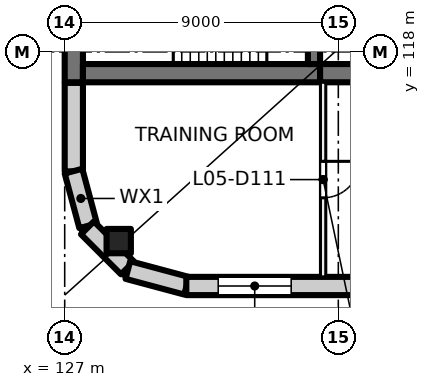
"""IFC4 building model, lengths in metres.
Left out: names, types, materials, properties, quantities, classifications, styles, units other than length and angle.
Written with IfcOpenShell. Run it as: python <this file> out.ifc"""

import sys

from ifc_helpers import new_model, si_unit, direction, frame, frame_2d, origin, origin_2d, place, context, subcontext, project, spatial, rectangle, extrude, element, fill, save


model = new_model("IFC4")
c1 = context("Model", 3, precision=1e-05, world=origin(), true_north=direction((0.0, 1.0)))
c2 = subcontext(c1, "Body", "Model", "MODEL_VIEW")
j1 = project(units=[si_unit("LENGTHUNIT", "METRE"), si_unit("PLANEANGLEUNIT", "RADIAN")], contexts=[c1])
p1 = place(None, origin())
s1 = spatial("IfcSite", under=j1, at=p1, CompositionType="ELEMENT")
p2 = place(p1, origin())
s2 = spatial("IfcBuilding", under=s1, at=p2, CompositionType="ELEMENT")
p3 = place(p2, frame((0.0, 0.0, 27.5)))
s3 = spatial("IfcBuildingStorey", under=s2, at=p3, CompositionType="ELEMENT", Elevation=27.5)
p4 = place(p3, frame((128.777, 111.777, 0.0), z_axis=(0.0, 0.0, 1.0), x_axis=(1.0, 0.0, 0.0)))
e1 = element("IfcColumn", 1, at=p4, inside=s3, PredefinedType="COLUMN", context=c2, shape_type="SweptSolid", body=[
    extrude(rectangle(XDim=0.8, YDim=0.8, at=origin_2d()), origin(), (0.0, 0.0, 1.0), 4.0),
])
p5 = place(p3, frame((127.3, 117.0, 0.0), z_axis=(0.0, 0.0, 1.0), x_axis=(0.0, 1.0, 0.0)))
e2 = element("IfcWall", 2, at=p5, inside=s3, PredefinedType="SHEAR", context=c2, shape_type="SweptSolid", body=[
    extrude(rectangle(XDim=3.8, YDim=0.6, at=frame_2d((1.9, 0.0))), origin(), (0.0, 0.0, 1.0), 4.0),
])
p6 = place(p3, frame((127.6, 117.3, 0.0), z_axis=(0.0, 0.0, 1.0), x_axis=(1.0, 0.0, 0.0)))
e3 = element("IfcWall", 3, at=p6, inside=s3, PredefinedType="SHEAR", context=c2, shape_type="SweptSolid", body=[
    extrude(rectangle(XDim=7.8, YDim=0.6, at=frame_2d((3.9, 0.0))), origin(), (0.0, 0.0, 1.0), 4.0),
])
p7 = place(p3, frame((135.4, 117.3, 0.0), z_axis=(0.0, 0.0, 1.0), x_axis=(1.0, 0.0, 0.0)))
e4 = element("IfcWall", 4, at=p7, inside=s3, PredefinedType="SHEAR", context=c2, shape_type="SweptSolid", body=[
    extrude(rectangle(XDim=4.6, YDim=0.6, at=frame_2d((2.3, 0.0))), origin(), (0.0, 0.0, 1.0), 4.0),
])
p8 = place(p3, frame((135.2, 117.6, 0.0), z_axis=(0.0, 0.0, 1.0), x_axis=(0.0, 1.0, 0.0)))
e5 = element("IfcWall", 5, at=p8, inside=s3, PredefinedType="SHEAR", context=c2, shape_type="SweptSolid", body=[
    extrude(rectangle(XDim=2.8, YDim=0.4, at=frame_2d((1.4, 0.0))), origin(), (0.0, 0.0, 1.0), 4.0),
])
p9 = place(p8, frame((0.9, 0.0, 0.0)))
e6 = element("IfcOpeningElement", 6, at=p9, cuts=e5, PredefinedType="OPENING", context=c2, shape_type="SweptSolid", body=[
    extrude(rectangle(XDim=1.0, YDim=2.1, at=frame_2d((0.5, 1.05))), frame((0.0, 0.21, 0.0), z_axis=(0.0, -1.0, 0.0), x_axis=(1.0, 0.0, 0.0)), (0.0, 0.0, 1.0), 0.42),
])
p10 = place(p3, frame((127.3, 114.07, 0.0), z_axis=(0.0, 0.0, 1.0), x_axis=(0.0, 1.0, 0.0)))
e7 = element("IfcWall", 7, at=p10, inside=s3, PredefinedType="SOLIDWALL", context=c2, shape_type="SweptSolid", body=[
    extrude(rectangle(XDim=2.91, YDim=0.6, at=frame_2d((1.455, 0.0))), origin(), (0.0, 0.0, 1.0), 3.625),
])
for number, where, z_axis, x_axis in (
    (8, (127.771, 112.281, 0.0), (0.0, 0.0, 1.0), (-0.259, 0.966, 0.0)),
    (9, (129.064, 110.896, 0.0), (0.0, 0.0, 1.0), (-0.707, 0.707, 0.0)),
):
    element("IfcWall", number, at=place(p3, frame(where, z_axis=z_axis, x_axis=x_axis)), inside=s3, PredefinedType="SOLIDWALL", context=c2, shape_type="SweptSolid", body=[
        extrude(rectangle(XDim=1.861, YDim=0.6, at=frame_2d((0.93, 0.0))), origin(), (0.0, 0.0, 1.0), 3.625),
    ])
p11 = place(p3, frame((131.01, 110.308, 0.0), z_axis=(0.0, 0.0, 1.0), x_axis=(-0.965920269068, 0.258839784042, 0.0)))
e10 = element("IfcWall", 10, at=p11, inside=s3, PredefinedType="SOLIDWALL", context=c2, shape_type="SweptSolid", body=[
    extrude(rectangle(XDim=2.0, YDim=0.6, at=frame_2d((1.0, 0.0))), origin(), (0.0, 0.0, 1.0), 3.625),
])
p12 = place(p3, frame((162.93, 110.3, 0.0), z_axis=(0.0, 0.0, 1.0), x_axis=(-1.0, 0.0, 0.0)))
e11 = element("IfcWall", 11, at=p12, inside=s3, PredefinedType="SOLIDWALL", context=c2, shape_type="SweptSolid", body=[
    extrude(rectangle(XDim=31.93, YDim=0.6, at=frame_2d((15.965, 0.0))), origin(), (0.0, 0.0, 1.0), 3.625),
])
p13 = place(p12, frame((1.78, 0.0, 0.0)))
e12 = element("IfcOpeningElement", 12, at=p13, cuts=e11, PredefinedType="OPENING", context=c2, shape_type="SweptSolid", body=[
    extrude(rectangle(XDim=1.8, YDim=2.4, at=frame_2d((0.9, 1.2))), frame((0.0, 0.31, 0.0), z_axis=(0.0, -1.0, 0.0), x_axis=(1.0, 0.0, 0.0)), (0.0, 0.0, 1.0), 0.62),
])
p14 = place(p12, frame((5.98, 0.0, 0.9)))
e13 = element("IfcOpeningElement", 13, at=p14, cuts=e11, PredefinedType="OPENING", context=c2, shape_type="SweptSolid", body=[
    extrude(rectangle(XDim=2.4, YDim=2.4, at=frame_2d((1.2, 1.2))), frame((0.0, 0.31, 0.0), z_axis=(0.0, -1.0, 0.0), x_axis=(1.0, 0.0, 0.0)), (0.0, 0.0, 1.0), 0.62),
])
p15 = place(p12, frame((10.48, 0.0, 0.9)))
e14 = element("IfcOpeningElement", 14, at=p15, cuts=e11, PredefinedType="OPENING", context=c2, shape_type="SweptSolid", body=[
    extrude(rectangle(XDim=2.4, YDim=2.4, at=frame_2d((1.2, 1.2))), frame((0.0, 0.31, 0.0), z_axis=(0.0, -1.0, 0.0), x_axis=(1.0, 0.0, 0.0)), (0.0, 0.0, 1.0), 0.62),
])
p16 = place(p12, frame((14.98, 0.0, 0.9)))
e15 = element("IfcOpeningElement", 15, at=p16, cuts=e11, PredefinedType="OPENING", context=c2, shape_type="SweptSolid", body=[
    extrude(rectangle(XDim=2.4, YDim=2.4, at=frame_2d((1.2, 1.2))), frame((0.0, 0.31, 0.0), z_axis=(0.0, -1.0, 0.0), x_axis=(1.0, 0.0, 0.0)), (0.0, 0.0, 1.0), 0.62),
])
p17 = place(p12, frame((19.78, 0.0, 0.0)))
e16 = element("IfcOpeningElement", 16, at=p17, cuts=e11, PredefinedType="OPENING", context=c2, shape_type="SweptSolid", body=[
    extrude(rectangle(XDim=1.8, YDim=2.4, at=frame_2d((0.9, 1.2))), frame((0.0, 0.31, 0.0), z_axis=(0.0, -1.0, 0.0), x_axis=(1.0, 0.0, 0.0)), (0.0, 0.0, 1.0), 0.62),
])
p18 = place(p12, frame((23.98, 0.0, 0.9)))
e17 = element("IfcOpeningElement", 17, at=p18, cuts=e11, PredefinedType="OPENING", context=c2, shape_type="SweptSolid", body=[
    extrude(rectangle(XDim=2.4, YDim=2.4, at=frame_2d((1.2, 1.2))), frame((0.0, 0.31, 0.0), z_axis=(0.0, -1.0, 0.0), x_axis=(1.0, 0.0, 0.0)), (0.0, 0.0, 1.0), 0.62),
])
p19 = place(p12, frame((28.48, 0.0, 0.9)))
e18 = element("IfcOpeningElement", 18, at=p19, cuts=e11, PredefinedType="OPENING", context=c2, shape_type="SweptSolid", body=[
    extrude(rectangle(XDim=2.4, YDim=2.4, at=frame_2d((1.2, 1.2))), frame((0.0, 0.31, 0.0), z_axis=(0.0, -1.0, 0.0), x_axis=(1.0, 0.0, 0.0)), (0.0, 0.0, 1.0), 0.62),
])
p20 = place(p3, frame((135.5, 117.0, 0.0), z_axis=(0.0, 0.0, 1.0), x_axis=(0.0, -1.0, 0.0)))
e19 = element("IfcWall", 19, at=p20, inside=s3, PredefinedType="PARTITIONING", context=c2, shape_type="SweptSolid", body=[
    extrude(rectangle(XDim=6.4, YDim=0.175, at=frame_2d((3.2, 0.0))), origin(), (0.0, 0.0, 1.0), 3.625),
])
p21 = place(p20, frame((2.6, 0.0, 0.0)))
e20 = element("IfcOpeningElement", 20, at=p21, cuts=e19, PredefinedType="OPENING", context=c2, shape_type="SweptSolid", body=[
    extrude(rectangle(XDim=1.2, YDim=2.1, at=frame_2d((0.6, 1.05))), frame((0.0, 0.097, 0.0), z_axis=(0.0, -1.0, 0.0), x_axis=(1.0, 0.0, 0.0)), (0.0, 0.0, 1.0), 0.195),
])
p22 = place(p19, origin())
e21 = element("IfcWindow", 21, at=p22, inside=s3, PartitioningType="SINGLE_PANEL", PredefinedType="WINDOW", context=c2, shape_type="SweptSolid", body=[
    extrude(rectangle(XDim=2.4, YDim=2.4, at=frame_2d((1.2, 1.2))), frame((0.0, 0.03, 0.0), z_axis=(0.0, -1.0, 0.0), x_axis=(1.0, 0.0, 0.0)), (0.0, 0.0, 1.0), 0.06),
])
fill(e18, e21)
p23 = place(p21, origin())
e22 = element("IfcDoor", 22, at=p23, inside=s3, OperationType="DOUBLE_DOOR_SINGLE_SWING", PredefinedType="DOOR", context=c2, shape_type="SweptSolid", body=[
    extrude(rectangle(XDim=1.2, YDim=2.1, at=frame_2d((0.6, 1.05))), frame((0.0, 0.025, 0.0), z_axis=(0.0, -1.0, 0.0), x_axis=(1.0, 0.0, 0.0)), (0.0, 0.0, 1.0), 0.05),
])
fill(e20, e22)
save(model, sys.argv[1])
